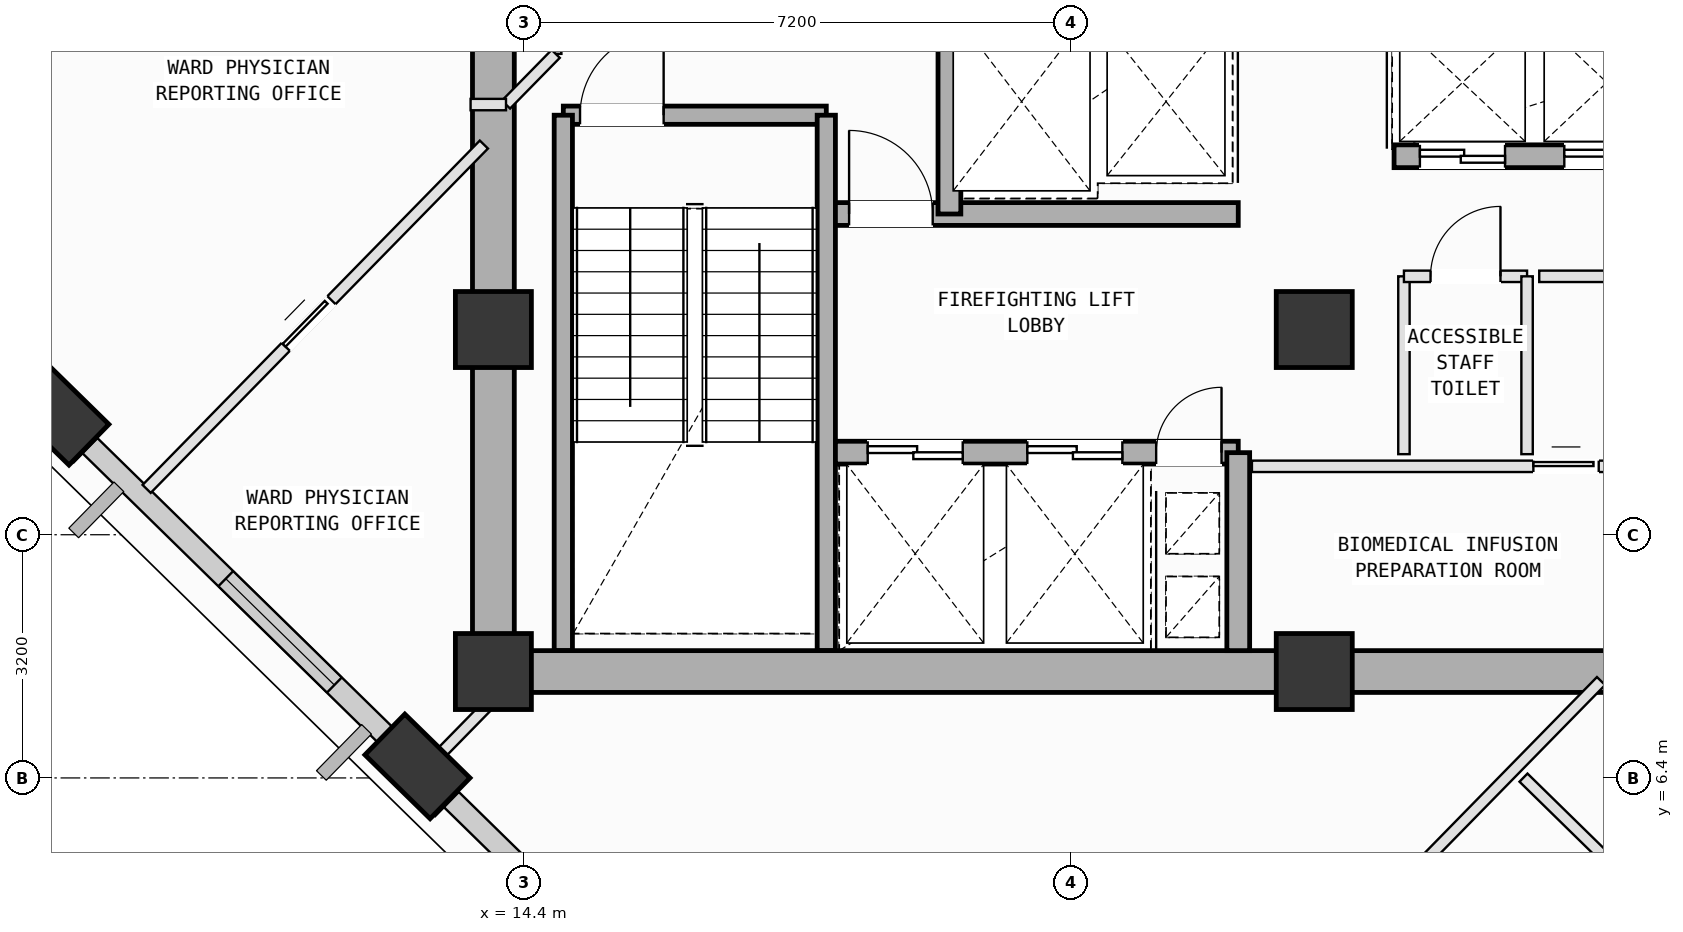
"""IFC4 building model, lengths in metres.
Left out: names, types, materials, properties, quantities, classifications, styles, units other than length and angle.
Written with IfcOpenShell. Run it as: python <this file> out.ifc"""

import sys

from ifc_helpers import new_model, si_unit, direction, frame, frame_2d, origin, origin_2d, place, context, subcontext, project, spatial, rectangle, extrude, element, fill, save


model = new_model("IFC4")
c1 = context("Model", 3, precision=1e-05, world=origin(), true_north=direction((0.0, 1.0)))
c2 = subcontext(c1, "Body", "Model", "MODEL_VIEW")
j1 = project(units=[si_unit("LENGTHUNIT", "METRE"), si_unit("PLANEANGLEUNIT", "RADIAN")], contexts=[c1])
p1 = place(None, origin())
s1 = spatial("IfcSite", under=j1, at=p1, CompositionType="ELEMENT")
p2 = place(p1, origin())
s2 = spatial("IfcBuilding", under=s1, at=p2, CompositionType="ELEMENT")
p3 = place(p2, frame((0.0, 0.0, 219.2)))
s3 = spatial("IfcBuildingStorey", under=s2, at=p3, CompositionType="ELEMENT", Elevation=219.2)
for number, where, z_axis, x_axis in (
    (1, (14.0, 7.8, 0.0), (0.0, 0.0, 1.0), (1.0, 0.0, 0.0)),
    (2, (14.0, 12.3, 0.0), (0.0, 0.0, 1.0), (1.0, 0.0, 0.0)),
    (3, (24.8, 7.8, 0.0), (0.0, 0.0, 1.0), (1.0, 0.0, 0.0)),
    (4, (24.8, 12.3, 0.0), (0.0, 0.0, 1.0), (1.0, 0.0, 0.0)),
):
    element("IfcColumn", number, at=place(p3, frame(where, z_axis=z_axis, x_axis=x_axis)), inside=s3, PredefinedType="COLUMN", context=c2, shape_type="SweptSolid", body=[
        extrude(rectangle(XDim=1.0, YDim=1.0, at=origin_2d()), origin(), (0.0, 0.0, 1.0), 4.0),
    ])
p4 = place(p3, frame((8.25, 11.205, 0.002), z_axis=(0.05677931028, -0.103852755554, 0.992970651675), x_axis=(-0.960175021282, 0.266844486947, 0.082812730257)))
e5 = element("IfcColumn", 5, at=p4, inside=s3, PredefinedType="COLUMN", context=c2, shape_type="SweptSolid", body=[
    extrude(rectangle(XDim=1.2, YDim=0.75, at=origin_2d()), origin(), (0.0, 0.0, 1.0), 4.025),
])
p5 = place(p3, frame((13.001, 6.552, 0.002), z_axis=(0.075811126539, -0.084248073367, 0.993556709618), x_axis=(-0.996094588489, 0.038827075158, 0.079297093368)))
e6 = element("IfcColumn", 6, at=p5, inside=s3, PredefinedType="COLUMN", context=c2, shape_type="SweptSolid", body=[
    extrude(rectangle(XDim=1.2, YDim=0.75, at=origin_2d()), origin(), (0.0, 0.0, 1.0), 4.022),
])
p6 = place(p3, frame((8.133, 11.319, 0.0), z_axis=(0.0, 0.0, 1.0), x_axis=(-0.714479464063, 0.699656412414, 0.0)))
e7 = element("IfcWall", 7, at=p6, inside=s3, PredefinedType="SOLIDWALL", context=c2, shape_type="SweptSolid", body=[
    extrude(rectangle(XDim=5.831, YDim=0.28, at=frame_2d((2.915, 0.0))), origin(), (0.0, 0.0, 1.0), 3.265),
])
p7 = place(p6, frame((0.84, 0.0, 0.75)))
e8 = element("IfcOpeningElement", 8, at=p7, cuts=e7, PredefinedType="OPENING", context=c2, shape_type="SweptSolid", body=[
    extrude(rectangle(XDim=1.6, YDim=1.95, at=frame_2d((0.8, 0.975))), frame((0.0, 0.15, 0.0), z_axis=(0.0, -1.0, 0.0), x_axis=(1.0, 0.0, 0.0)), (0.0, 0.0, 1.0), 0.3),
])
p8 = place(p3, frame((12.88, 6.671, 0.0), z_axis=(0.0, 0.0, 1.0), x_axis=(-0.714482661458, 0.699653147263, 0.0)))
e9 = element("IfcWall", 9, at=p8, inside=s3, PredefinedType="SOLIDWALL", context=c2, shape_type="SweptSolid", body=[
    extrude(rectangle(XDim=5.861, YDim=0.28, at=frame_2d((2.93, 0.0))), origin(), (0.0, 0.0, 1.0), 3.265),
])
p9 = place(p8, frame((1.36, 0.0, 0.75)))
e10 = element("IfcOpeningElement", 10, at=p9, cuts=e9, PredefinedType="OPENING", context=c2, shape_type="SweptSolid", body=[
    extrude(rectangle(XDim=2.0, YDim=1.95, at=frame_2d((1.0, 0.975))), frame((0.0, 0.15, 0.0), z_axis=(0.0, -1.0, 0.0), x_axis=(1.0, 0.0, 0.0)), (0.0, 0.0, 1.0), 0.3),
])
p10 = place(p3, frame((18.848, 0.826, 0.0), z_axis=(0.0, 0.0, 1.0), x_axis=(-0.714480823881, 0.699655023784, 0.0)))
e11 = element("IfcWall", 11, at=p10, inside=s3, PredefinedType="SOLIDWALL", context=c2, shape_type="SweptSolid", body=[
    extrude(rectangle(XDim=7.559, YDim=0.28, at=frame_2d((3.779, 0.0))), origin(), (0.0, 0.0, 1.0), 3.265),
])
p11 = place(p10, frame((4.706, 0.0, 0.75)))
e12 = element("IfcOpeningElement", 12, at=p11, cuts=e11, PredefinedType="OPENING", context=c2, shape_type="SweptSolid", body=[
    extrude(rectangle(XDim=1.4, YDim=1.85, at=frame_2d((0.7, 0.925))), frame((0.0, 0.15, 0.0), z_axis=(0.0, -1.0, 0.0), x_axis=(1.0, 0.0, 0.0)), (0.0, 0.0, 1.0), 0.3),
])
p12 = place(p3, frame((14.92, 15.12, 0.0), z_axis=(0.0, 0.0, 1.0), x_axis=(1.0, 0.0, 0.0)))
e13 = element("IfcWall", 13, at=p12, inside=s3, PredefinedType="SOLIDWALL", context=c2, shape_type="SweptSolid", body=[
    extrude(rectangle(XDim=3.46, YDim=0.24, at=frame_2d((1.73, 0.0))), origin(), (0.0, 0.0, 1.0), 3.78),
])
p13 = place(p12, frame((0.22, 0.0, 0.0)))
e14 = element("IfcOpeningElement", 14, at=p13, cuts=e13, PredefinedType="OPENING", context=c2, shape_type="SweptSolid", body=[
    extrude(rectangle(XDim=1.1, YDim=2.15, at=frame_2d((0.55, 1.075))), frame((0.0, 0.13, 0.0), z_axis=(0.0, -1.0, 0.0), x_axis=(1.0, 0.0, 0.0)), (0.0, 0.0, 1.0), 0.26),
])
for number, where, z_axis, x_axis in (
    (15, (18.38, 15.12, 0.0), (0.0, 0.0, 1.0), (0.0, -1.0, 0.0)),
    (16, (14.92, 8.075, 0.0), (0.0, 0.0, 1.0), (0.0, 1.0, 0.0)),
):
    element("IfcWall", number, at=place(p3, frame(where, z_axis=z_axis, x_axis=x_axis)), inside=s3, PredefinedType="SOLIDWALL", context=c2, shape_type="SweptSolid", body=[
        extrude(rectangle(XDim=7.045, YDim=0.24, at=frame_2d((3.522, 0.0))), origin(), (0.0, 0.0, 1.0), 3.78),
    ])
for number, where, z_axis, x_axis in (
    (17, (14.0, 7.8, 0.0), (0.0, 0.0, 1.0), (1.0, 0.0, 0.0)),
    (18, (24.8, 7.8, 0.0), (0.0, 0.0, 1.0), (1.0, 0.0, 0.0)),
):
    element("IfcWall", number, at=place(p3, frame(where, z_axis=z_axis, x_axis=x_axis)), inside=s3, PredefinedType="SHEAR", context=c2, shape_type="SweptSolid", body=[
        extrude(rectangle(XDim=10.8, YDim=0.55, at=frame_2d((5.4, 0.0))), origin(), (0.0, 0.0, 1.0), 3.78),
    ])
p14 = place(p3, frame((14.0, 16.8, 0.0), z_axis=(0.0, 0.0, 1.0), x_axis=(0.0, -1.0, 0.0)))
e19 = element("IfcWall", 19, at=p14, inside=s3, PredefinedType="SHEAR", context=c2, shape_type="SweptSolid", body=[
    extrude(rectangle(XDim=9.0, YDim=0.55, at=frame_2d((4.5, 0.0))), origin(), (0.0, 0.0, 1.0), 3.78),
])
p15 = place(p3, frame((18.5, 10.68, 0.0), z_axis=(0.0, 0.0, 1.0), x_axis=(1.0, 0.0, 0.0)))
e20 = element("IfcWall", 20, at=p15, inside=s3, PredefinedType="SOLIDWALL", context=c2, shape_type="SweptSolid", body=[
    extrude(rectangle(XDim=5.3, YDim=0.3, at=frame_2d((2.65, 0.0))), origin(), (0.0, 0.0, 1.0), 3.78),
])
p16 = place(p15, frame((4.22, 0.0, 0.0)))
e21 = element("IfcOpeningElement", 21, at=p16, cuts=e20, PredefinedType="OPENING", context=c2, shape_type="SweptSolid", body=[
    extrude(rectangle(XDim=0.86, YDim=2.06, at=frame_2d((0.43, 1.03))), frame((0.0, 0.16, 0.0), z_axis=(0.0, -1.0, 0.0), x_axis=(1.0, 0.0, 0.0)), (0.0, 0.0, 1.0), 0.32),
])
p17 = place(p15, frame((0.425, 0.0, 0.0)))
e22 = element("IfcOpeningElement", 22, at=p17, cuts=e20, PredefinedType="OPENING", context=c2, shape_type="SweptSolid", body=[
    extrude(rectangle(XDim=1.25, YDim=2.18, at=frame_2d((0.625, 1.09))), frame((0.0, 0.16, 0.0), z_axis=(0.0, -1.0, 0.0), x_axis=(1.0, 0.0, 0.0)), (0.0, 0.0, 1.0), 0.32),
])
p18 = place(p15, frame((2.525, 0.0, 0.0)))
e23 = element("IfcOpeningElement", 23, at=p18, cuts=e20, PredefinedType="OPENING", context=c2, shape_type="SweptSolid", body=[
    extrude(rectangle(XDim=1.25, YDim=2.18, at=frame_2d((0.625, 1.09))), frame((0.0, 0.16, 0.0), z_axis=(0.0, -1.0, 0.0), x_axis=(1.0, 0.0, 0.0)), (0.0, 0.0, 1.0), 0.32),
])
p19 = place(p3, frame((18.5, 13.82, 0.0), z_axis=(0.0, 0.0, 1.0), x_axis=(1.0, 0.0, 0.0)))
e24 = element("IfcWall", 24, at=p19, inside=s3, PredefinedType="SOLIDWALL", context=c2, shape_type="SweptSolid", body=[
    extrude(rectangle(XDim=5.3, YDim=0.3, at=frame_2d((2.65, 0.0))), origin(), (0.0, 0.0, 1.0), 3.78),
])
p20 = place(p19, frame((0.18, 0.0, 0.0)))
e25 = element("IfcOpeningElement", 25, at=p20, cuts=e24, PredefinedType="OPENING", context=c2, shape_type="SweptSolid", body=[
    extrude(rectangle(XDim=1.1, YDim=2.15, at=frame_2d((0.55, 1.075))), frame((0.0, 0.16, 0.0), z_axis=(0.0, -1.0, 0.0), x_axis=(1.0, 0.0, 0.0)), (0.0, 0.0, 1.0), 0.32),
])
p21 = place(p3, frame((23.8, 8.075, 0.0), z_axis=(0.0, 0.0, 1.0), x_axis=(0.0, 1.0, 0.0)))
e26 = element("IfcWall", 26, at=p21, inside=s3, PredefinedType="SOLIDWALL", context=c2, shape_type="SweptSolid", body=[
    extrude(rectangle(XDim=2.605, YDim=0.3, at=frame_2d((1.302, 0.0))), origin(), (0.0, 0.0, 1.0), 3.78),
])
p22 = place(p3, frame((20.0, 13.82, 0.0), z_axis=(0.0, 0.0, 1.0), x_axis=(0.0, 1.0, 0.0)))
e27 = element("IfcWall", 27, at=p22, inside=s3, PredefinedType="SOLIDWALL", context=c2, shape_type="SweptSolid", body=[
    extrude(rectangle(XDim=2.73, YDim=0.3, at=frame_2d((1.365, 0.0))), origin(), (0.0, 0.0, 1.0), 3.78),
])
p23 = place(p3, frame((25.85, 14.58, 0.0), z_axis=(0.0, 0.0, 1.0), x_axis=(1.0, 0.0, 0.0)))
e28 = element("IfcWall", 28, at=p23, inside=s3, PredefinedType="SOLIDWALL", context=c2, shape_type="SweptSolid", body=[
    extrude(rectangle(XDim=5.45, YDim=0.3, at=frame_2d((2.725, 0.0))), origin(), (0.0, 0.0, 1.0), 3.78),
])
p24 = place(p23, frame((0.34, 0.0, 0.0)))
e29 = element("IfcOpeningElement", 29, at=p24, cuts=e28, PredefinedType="OPENING", context=c2, shape_type="SweptSolid", body=[
    extrude(rectangle(XDim=1.12, YDim=2.15, at=frame_2d((0.56, 1.075))), frame((0.0, 0.16, 0.0), z_axis=(0.0, -1.0, 0.0), x_axis=(1.0, 0.0, 0.0)), (0.0, 0.0, 1.0), 0.32),
])
p25 = place(p23, frame((2.24, 0.0, 0.0)))
e30 = element("IfcOpeningElement", 30, at=p25, cuts=e28, PredefinedType="OPENING", context=c2, shape_type="SweptSolid", body=[
    extrude(rectangle(XDim=1.12, YDim=2.15, at=frame_2d((0.56, 1.075))), frame((0.0, 0.16, 0.0), z_axis=(0.0, -1.0, 0.0), x_axis=(1.0, 0.0, 0.0)), (0.0, 0.0, 1.0), 0.32),
])
p26 = place(p3, frame((23.98, 10.5, 0.0), z_axis=(0.0, 0.0, 1.0), x_axis=(1.0, 0.0, 0.0)))
e31 = element("IfcWall", 31, at=p26, inside=s3, PredefinedType="PARTITIONING", context=c2, shape_type="SweptSolid", body=[
    extrude(rectangle(XDim=5.4, YDim=0.15, at=frame_2d((2.7, 0.0))), origin(), (0.0, 0.0, 1.0), 3.78),
])
p27 = place(p26, frame((3.703, 0.0, 0.0)))
e32 = element("IfcOpeningElement", 32, at=p27, cuts=e31, PredefinedType="OPENING", context=c2, shape_type="SweptSolid", body=[
    extrude(rectangle(XDim=0.86, YDim=2.06, at=frame_2d((0.43, 1.03))), frame((0.0, 0.085, 0.0), z_axis=(0.0, -1.0, 0.0), x_axis=(1.0, 0.0, 0.0)), (0.0, 0.0, 1.0), 0.17),
])
p28 = place(p3, frame((25.98, 10.66, 0.0), z_axis=(0.0, 0.0, 1.0), x_axis=(0.0, 1.0, 0.0)))
e33 = element("IfcWall", 33, at=p28, inside=s3, PredefinedType="PARTITIONING", context=c2, shape_type="SweptSolid", body=[
    extrude(rectangle(XDim=2.34, YDim=0.15, at=frame_2d((1.17, 0.0))), origin(), (0.0, 0.0, 1.0), 3.78),
])
p29 = place(p3, frame((25.98, 13.0, 0.0), z_axis=(0.0, 0.0, 1.0), x_axis=(1.0, 0.0, 0.0)))
e34 = element("IfcWall", 34, at=p29, inside=s3, PredefinedType="PARTITIONING", context=c2, shape_type="SweptSolid", body=[
    extrude(rectangle(XDim=1.62, YDim=0.15, at=frame_2d((0.81, 0.0))), origin(), (0.0, 0.0, 1.0), 3.78),
])
p30 = place(p29, frame((0.35, 0.0, 0.0)))
e35 = element("IfcOpeningElement", 35, at=p30, cuts=e34, PredefinedType="OPENING", context=c2, shape_type="SweptSolid", body=[
    extrude(rectangle(XDim=0.92, YDim=2.1, at=frame_2d((0.46, 1.05))), frame((0.0, 0.085, 0.0), z_axis=(0.0, -1.0, 0.0), x_axis=(1.0, 0.0, 0.0)), (0.0, 0.0, 1.0), 0.17),
])
p31 = place(p3, frame((27.6, 13.0, 0.0), z_axis=(0.0, 0.0, 1.0), x_axis=(0.0, -1.0, 0.0)))
e36 = element("IfcWall", 36, at=p31, inside=s3, PredefinedType="PARTITIONING", context=c2, shape_type="SweptSolid", body=[
    extrude(rectangle(XDim=2.34, YDim=0.15, at=frame_2d((1.17, 0.0))), origin(), (0.0, 0.0, 1.0), 3.78),
])
p32 = place(p3, frame((27.76, 13.0, 0.0), z_axis=(0.0, 0.0, 1.0), x_axis=(1.0, 0.0, 0.0)))
e37 = element("IfcWall", 37, at=p32, inside=s3, PredefinedType="PARTITIONING", context=c2, shape_type="SweptSolid", body=[
    extrude(rectangle(XDim=1.62, YDim=0.15, at=frame_2d((0.81, 0.0))), origin(), (0.0, 0.0, 1.0), 3.78),
])
p33 = place(p3, frame((37.259, -3.101, 0.0), z_axis=(0.0, 0.0, 1.0), x_axis=(-0.714463260908, 0.699672958469, 0.0)))
e38 = element("IfcWall", 38, at=p33, inside=s3, PredefinedType="PARTITIONING", context=c2, shape_type="SweptSolid", body=[
    extrude(rectangle(XDim=13.585, YDim=0.15, at=frame_2d((6.792, 0.0))), origin(), (0.0, 0.0, 1.0), 3.78),
])
p34 = place(p3, frame((28.573, 7.675, 0.0), z_axis=(0.0, 0.0, 1.0), x_axis=(-0.699638018891, -0.714497475519, 0.0)))
e39 = element("IfcWall", 39, at=p34, inside=s3, PredefinedType="PARTITIONING", context=c2, shape_type="SweptSolid", body=[
    extrude(rectangle(XDim=11.583, YDim=0.15, at=frame_2d((5.792, 0.0))), origin(), (0.0, 0.0, 1.0), 3.78),
])
p35 = place(p3, frame((13.287, 5.951, 0.0), z_axis=(0.0, 0.0, 1.0), x_axis=(-0.714510426493, 0.699624792608, 0.0)))
e40 = element("IfcWall", 40, at=p35, inside=s3, PredefinedType="PARTITIONING", context=c2, shape_type="SweptSolid", body=[
    extrude(rectangle(XDim=0.525, YDim=0.15, at=frame_2d((0.262, 0.0))), origin(), (0.0, 0.0, 1.0), 3.265),
])
p36 = place(p3, frame((12.912, 6.318, 0.0), z_axis=(0.0, 0.0, 1.0), x_axis=(0.699538437275, 0.714594972536, 0.0)))
e41 = element("IfcWall", 41, at=p36, inside=s3, PredefinedType="PARTITIONING", context=c2, shape_type="SweptSolid", body=[
    extrude(rectangle(XDim=1.654, YDim=0.15, at=frame_2d((0.827, 0.0))), origin(), (0.0, 0.0, 1.0), 3.78),
])
p37 = place(p3, frame((9.438, 10.203, 0.0), z_axis=(0.0, 0.0, 1.0), x_axis=(0.699657139169, 0.714478752385, 0.0)))
e42 = element("IfcWall", 42, at=p37, inside=s3, PredefinedType="PARTITIONING", context=c2, shape_type="SweptSolid", body=[
    extrude(rectangle(XDim=6.342, YDim=0.15, at=frame_2d((3.171, 0.0))), origin(), (0.0, 0.0, 1.0), 3.78),
])
p38 = place(p37, frame((2.616, 0.0, 0.0)))
e43 = element("IfcOpeningElement", 43, at=p38, cuts=e42, PredefinedType="OPENING", context=c2, shape_type="SweptSolid", body=[
    extrude(rectangle(XDim=0.86, YDim=2.06, at=frame_2d((0.43, 1.03))), frame((0.0, 0.085, 0.0), z_axis=(0.0, -1.0, 0.0), x_axis=(1.0, 0.0, 0.0)), (0.0, 0.0, 1.0), 0.17),
])
p39 = place(p3, frame((14.82, 18.2, 0.0), z_axis=(0.0, 0.0, 1.0), x_axis=(0.0, -1.0, 0.0)))
e44 = element("IfcWall", 44, at=p39, inside=s3, PredefinedType="PARTITIONING", context=c2, shape_type="SweptSolid", body=[
    extrude(rectangle(XDim=2.273, YDim=0.15, at=frame_2d((1.136, 0.0))), origin(), (0.0, 0.0, 1.0), 3.78),
])
p40 = place(p3, frame((14.82, 15.927, 0.0), z_axis=(0.0, 0.0, 1.0), x_axis=(-0.700147182602, -0.713998545303, 0.0)))
e45 = element("IfcWall", 45, at=p40, inside=s3, PredefinedType="PARTITIONING", context=c2, shape_type="SweptSolid", body=[
    extrude(rectangle(XDim=0.934, YDim=0.15, at=frame_2d((0.467, 0.0))), origin(), (0.0, 0.0, 1.0), 3.78),
])
p41 = place(p3, frame((14.166, 15.26, 0.0), z_axis=(0.0, 0.0, 1.0), x_axis=(-1.0, 0.0, 0.0)))
e46 = element("IfcWall", 46, at=p41, inside=s3, PredefinedType="PARTITIONING", context=c2, shape_type="SweptSolid", body=[
    extrude(rectangle(XDim=0.466, YDim=0.15, at=frame_2d((0.233, 0.0))), origin(), (0.0, 0.0, 1.0), 3.78),
])
p42 = place(p3, frame((8.532, 10.607, 0.0), z_axis=(0.0, 0.0, 1.0), x_axis=(-0.714698587823, 0.699432576139, 0.0)))
e47 = element("IfcWall", 47, at=p42, inside=s3, PredefinedType="PARTITIONING", context=c2, shape_type="SweptSolid", body=[
    extrude(rectangle(XDim=0.784, YDim=0.15, at=frame_2d((0.392, 0.0))), origin(), (0.0, 0.0, 1.0), 3.265),
])
p43 = place(p3, frame((5.723, 13.841, 0.0), z_axis=(0.0, 0.0, 1.0), x_axis=(0.69966395239, 0.714472080438, 0.0)))
e48 = element("IfcWall", 48, at=p43, inside=s3, PredefinedType="PARTITIONING", context=c2, shape_type="SweptSolid", body=[
    extrude(rectangle(XDim=15.185, YDim=0.15, at=frame_2d((7.592, 0.0))), origin(), (0.0, 0.0, 1.0), 3.78),
])
p44 = place(p9, origin())
e49 = element("IfcWindow", 49, at=p44, inside=s3, PartitioningType="SINGLE_PANEL", PredefinedType="WINDOW", context=c2, shape_type="SweptSolid", body=[
    extrude(rectangle(XDim=2.0, YDim=1.95, at=frame_2d((1.0, 0.975))), frame((0.0, 0.03, 0.0), z_axis=(0.0, -1.0, 0.0), x_axis=(1.0, 0.0, 0.0)), (0.0, 0.0, 1.0), 0.06),
])
fill(e10, e49)
p45 = place(p13, origin())
e50 = element("IfcDoor", 50, at=p45, inside=s3, OperationType="SINGLE_SWING_RIGHT", PredefinedType="DOOR", context=c2, shape_type="SweptSolid", body=[
    extrude(rectangle(XDim=1.1, YDim=2.15, at=frame_2d((0.55, 1.075))), frame((0.0, 0.025, 0.0), z_axis=(0.0, -1.0, 0.0), x_axis=(1.0, 0.0, 0.0)), (0.0, 0.0, 1.0), 0.05),
])
fill(e14, e50)
p46 = place(p16, origin())
e51 = element("IfcDoor", 51, at=p46, inside=s3, OperationType="SINGLE_SWING_RIGHT", PredefinedType="DOOR", context=c2, shape_type="SweptSolid", body=[
    extrude(rectangle(XDim=0.86, YDim=2.06, at=frame_2d((0.43, 1.03))), frame((0.0, 0.025, 0.0), z_axis=(0.0, -1.0, 0.0), x_axis=(1.0, 0.0, 0.0)), (0.0, 0.0, 1.0), 0.05),
])
fill(e21, e51)
p47 = place(p20, origin())
e52 = element("IfcDoor", 52, at=p47, inside=s3, OperationType="SINGLE_SWING_LEFT", PredefinedType="DOOR", context=c2, shape_type="SweptSolid", body=[
    extrude(rectangle(XDim=1.1, YDim=2.15, at=frame_2d((0.55, 1.075))), frame((0.0, 0.025, 0.0), z_axis=(0.0, -1.0, 0.0), x_axis=(1.0, 0.0, 0.0)), (0.0, 0.0, 1.0), 0.05),
])
fill(e25, e52)
p48 = place(p17, origin())
e53 = element("IfcDoor", 53, at=p48, inside=s3, OperationType="DOUBLE_DOOR_SLIDING", PredefinedType="DOOR", context=c2, shape_type="SweptSolid", body=[
    extrude(rectangle(XDim=1.25, YDim=2.18, at=frame_2d((0.625, 1.09))), frame((0.0, 0.025, 0.0), z_axis=(0.0, -1.0, 0.0), x_axis=(1.0, 0.0, 0.0)), (0.0, 0.0, 1.0), 0.05),
])
fill(e22, e53)
p49 = place(p18, origin())
e54 = element("IfcDoor", 54, at=p49, inside=s3, OperationType="DOUBLE_DOOR_SLIDING", PredefinedType="DOOR", context=c2, shape_type="SweptSolid", body=[
    extrude(rectangle(XDim=1.25, YDim=2.18, at=frame_2d((0.625, 1.09))), frame((0.0, 0.025, 0.0), z_axis=(0.0, -1.0, 0.0), x_axis=(1.0, 0.0, 0.0)), (0.0, 0.0, 1.0), 0.05),
])
fill(e23, e54)
p50 = place(p24, origin())
e55 = element("IfcDoor", 55, at=p50, inside=s3, OperationType="DOUBLE_DOOR_SLIDING", PredefinedType="DOOR", context=c2, shape_type="SweptSolid", body=[
    extrude(rectangle(XDim=1.12, YDim=2.15, at=frame_2d((0.56, 1.075))), frame((0.0, 0.025, 0.0), z_axis=(0.0, -1.0, 0.0), x_axis=(1.0, 0.0, 0.0)), (0.0, 0.0, 1.0), 0.05),
])
fill(e29, e55)
p51 = place(p25, origin())
e56 = element("IfcDoor", 56, at=p51, inside=s3, OperationType="DOUBLE_DOOR_SLIDING", PredefinedType="DOOR", context=c2, shape_type="SweptSolid", body=[
    extrude(rectangle(XDim=1.12, YDim=2.15, at=frame_2d((0.56, 1.075))), frame((0.0, 0.025, 0.0), z_axis=(0.0, -1.0, 0.0), x_axis=(1.0, 0.0, 0.0)), (0.0, 0.0, 1.0), 0.05),
])
fill(e30, e56)
p52 = place(p30, origin())
e57 = element("IfcDoor", 57, at=p52, inside=s3, OperationType="SINGLE_SWING_RIGHT", PredefinedType="DOOR", context=c2, shape_type="SweptSolid", body=[
    extrude(rectangle(XDim=0.92, YDim=2.1, at=frame_2d((0.46, 1.05))), frame((0.0, 0.025, 0.0), z_axis=(0.0, -1.0, 0.0), x_axis=(1.0, 0.0, 0.0)), (0.0, 0.0, 1.0), 0.05),
])
fill(e35, e57)
p53 = place(p27, origin())
e58 = element("IfcDoor", 58, at=p53, inside=s3, OperationType="SLIDING_TO_LEFT", PredefinedType="DOOR", context=c2, shape_type="SweptSolid", body=[
    extrude(rectangle(XDim=0.86, YDim=2.06, at=frame_2d((0.43, 1.03))), frame((0.0, 0.025, 0.0), z_axis=(0.0, -1.0, 0.0), x_axis=(1.0, 0.0, 0.0)), (0.0, 0.0, 1.0), 0.05),
])
fill(e32, e58)
p54 = place(p38, origin())
e59 = element("IfcDoor", 59, at=p54, inside=s3, OperationType="SLIDING_TO_LEFT", PredefinedType="DOOR", context=c2, shape_type="SweptSolid", body=[
    extrude(rectangle(XDim=0.86, YDim=2.06, at=frame_2d((0.43, 1.03))), frame((0.0, 0.025, 0.0), z_axis=(0.0, -1.0, 0.0), x_axis=(1.0, 0.0, 0.0)), (0.0, 0.0, 1.0), 0.05),
])
fill(e43, e59)
save(model, sys.argv[1])
